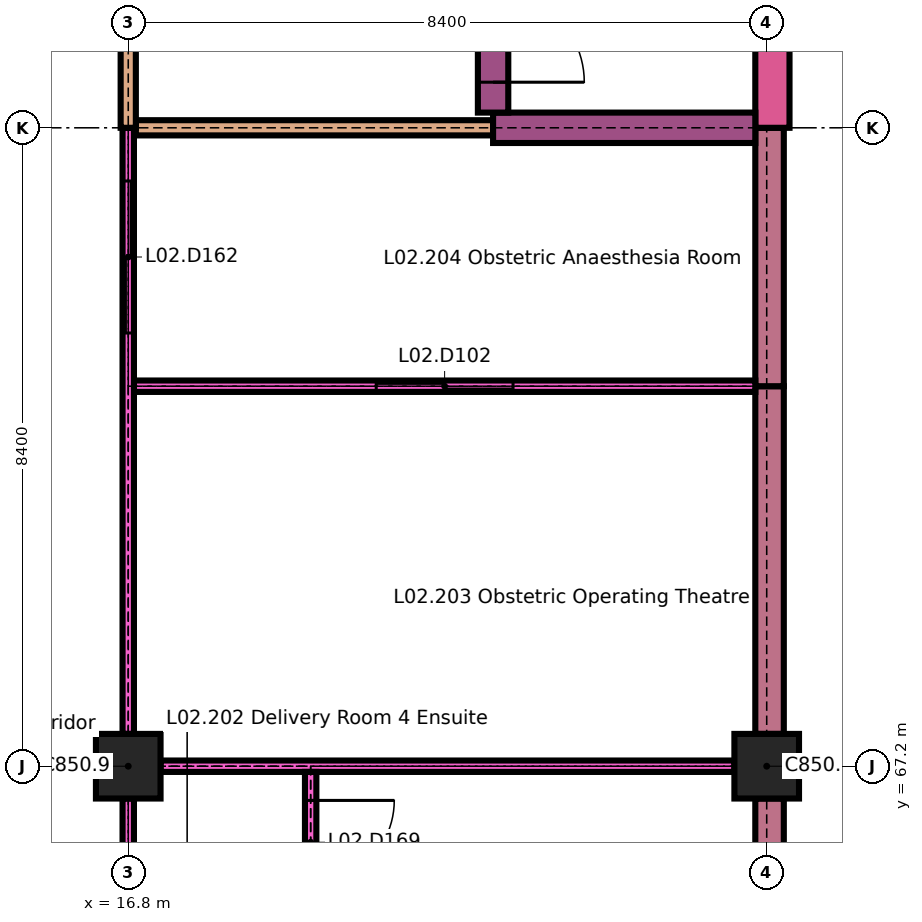
"""IFC4 building model, lengths in metres.
Left out: names, types, materials, properties, quantities, classifications, styles, units other than length and angle.
Written with IfcOpenShell. Run it as: python <this file> out.ifc"""

import sys

from ifc_helpers import new_model, si_unit, direction, frame, frame_2d, origin, origin_2d, place, context, subcontext, project, spatial, rectangle, extrude, element, fill, save


model = new_model("IFC4")
c1 = context("Model", 3, precision=1e-05, world=origin(), true_north=direction((0.0, 1.0)))
c2 = subcontext(c1, "Body", "Model", "MODEL_VIEW")
j1 = project(units=[si_unit("LENGTHUNIT", "METRE"), si_unit("PLANEANGLEUNIT", "RADIAN")], contexts=[c1])
p1 = place(None, origin())
s1 = spatial("IfcSite", under=j1, at=p1, CompositionType="ELEMENT")
p2 = place(p1, origin())
s2 = spatial("IfcBuilding", under=s1, at=p2, CompositionType="ELEMENT")
p3 = place(p2, frame((0.0, 0.0, 8.4)))
s3 = spatial("IfcBuildingStorey", under=s2, at=p3, CompositionType="ELEMENT", Elevation=8.4)
for number, where, z_axis, x_axis in (
    (1, (16.8, 67.2, 0.0), (0.0, 0.0, 1.0), (1.0, 0.0, 0.0)),
    (2, (25.2, 67.2, 0.0), (0.0, 0.0, 1.0), (1.0, 0.0, 0.0)),
):
    element("IfcColumn", number, at=place(p3, frame(where, z_axis=z_axis, x_axis=x_axis)), inside=s3, PredefinedType="COLUMN", context=c2, shape_type="SweptSolid", body=[
        extrude(rectangle(XDim=0.85, YDim=0.85, at=origin_2d()), origin(), (0.0, 0.0, 1.0), 4.2),
    ])
p4 = place(p3, frame((25.238, 63.0, 0.0), z_axis=(0.0, 0.0, 1.0), x_axis=(0.0, 1.0, 0.0)))
e3 = element("IfcWall", 3, at=p4, inside=s3, PredefinedType="SOLIDWALL", context=c2, shape_type="SweptSolid", body=[
    extrude(rectangle(XDim=3.775, YDim=0.375, at=frame_2d((1.887, 0.0))), origin(), (0.0, 0.0, 1.0), 3.9),
])
p5 = place(p4, frame((1.05, 0.0, 0.9)))
e4 = element("IfcOpeningElement", 4, at=p5, cuts=e3, PredefinedType="OPENING", context=c2, shape_type="SweptSolid", body=[
    extrude(rectangle(XDim=2.1, YDim=2.1, at=frame_2d((1.05, 1.05))), frame((0.0, 0.198, 0.0), z_axis=(0.0, -1.0, 0.0), x_axis=(1.0, 0.0, 0.0)), (0.0, 0.0, 1.0), 0.395),
])
p6 = place(p3, frame((25.238, 67.625, 0.0), z_axis=(0.0, 0.0, 1.0), x_axis=(0.0, 1.0, 0.0)))
e5 = element("IfcWall", 5, at=p6, inside=s3, PredefinedType="SOLIDWALL", context=c2, shape_type="SweptSolid", body=[
    extrude(rectangle(XDim=4.575, YDim=0.375, at=frame_2d((2.288, 0.0))), origin(), (0.0, 0.0, 1.0), 3.9),
])
p7 = place(p3, frame((25.238, 72.2, 0.0), z_axis=(0.0, 0.0, 1.0), x_axis=(0.0, 1.0, 0.0)))
e6 = element("IfcWall", 6, at=p7, inside=s3, PredefinedType="SOLIDWALL", context=c2, shape_type="SweptSolid", body=[
    extrude(rectangle(XDim=3.4, YDim=0.375, at=frame_2d((1.7, 0.0))), origin(), (0.0, 0.0, 1.0), 3.9),
])
p8 = place(p3, frame((25.275, 75.6, 0.0), z_axis=(0.0, 0.0, 1.0), x_axis=(0.0, 1.0, 0.0)))
e7 = element("IfcWall", 7, at=p8, inside=s3, PredefinedType="SOLIDWALL", context=c2, shape_type="SweptSolid", body=[
    extrude(rectangle(XDim=3.15, YDim=0.45, at=frame_2d((1.575, 0.0))), origin(), (0.0, 0.0, 1.0), 4.2),
])
p9 = place(p3, frame((17.225, 67.2, 0.0), z_axis=(0.0, 0.0, 1.0), x_axis=(1.0, 0.0, 0.0)))
e8 = element("IfcWall", 8, at=p9, inside=s3, PredefinedType="PARTITIONING", context=c2, shape_type="SweptSolid", body=[
    extrude(rectangle(XDim=7.55, YDim=0.15, at=frame_2d((3.775, 0.0))), origin(), (0.0, 0.0, 1.0), 4.2),
])
p10 = place(p3, frame((16.875, 72.2, 0.0), z_axis=(0.0, 0.0, 1.0), x_axis=(1.0, 0.0, 0.0)))
e9 = element("IfcWall", 9, at=p10, inside=s3, PredefinedType="PARTITIONING", context=c2, shape_type="SweptSolid", body=[
    extrude(rectangle(XDim=8.175, YDim=0.15, at=frame_2d((4.087, 0.0))), origin(), (0.0, 0.0, 1.0), 4.2),
])
p11 = place(p10, frame((3.188, 0.0, 0.0)))
e10 = element("IfcOpeningElement", 10, at=p11, cuts=e9, PredefinedType="OPENING", context=c2, shape_type="SweptSolid", body=[
    extrude(rectangle(XDim=1.8, YDim=2.4, at=frame_2d((0.9, 1.2))), frame((0.0, 0.085, 0.0), z_axis=(0.0, -1.0, 0.0), x_axis=(1.0, 0.0, 0.0)), (0.0, 0.0, 1.0), 0.17),
])
p12 = place(p3, frame((16.9, 75.6, 0.0), z_axis=(0.0, 0.0, 1.0), x_axis=(1.0, 0.0, 0.0)))
e11 = element("IfcWall", 11, at=p12, inside=s3, PredefinedType="PARTITIONING", context=c2, shape_type="SweptSolid", body=[
    extrude(rectangle(XDim=4.7, YDim=0.2, at=frame_2d((2.35, 0.0))), origin(), (0.0, 0.0, 1.0), 4.2),
])
p13 = place(p3, frame((21.6, 75.6, 0.0), z_axis=(0.0, 0.0, 1.0), x_axis=(1.0, 0.0, 0.0)))
e12 = element("IfcWall", 12, at=p13, inside=s3, PredefinedType="SHEAR", context=c2, shape_type="SweptSolid", body=[
    extrude(rectangle(XDim=3.45, YDim=0.4, at=frame_2d((1.725, 0.0))), origin(), (0.0, 0.0, 1.0), 4.2),
])
p14 = place(p3, frame((16.8, 59.225, 0.0), z_axis=(0.0, 0.0, 1.0), x_axis=(0.0, 1.0, 0.0)))
e13 = element("IfcWall", 13, at=p14, inside=s3, PredefinedType="PARTITIONING", context=c2, shape_type="SweptSolid", body=[
    extrude(rectangle(XDim=7.55, YDim=0.15, at=frame_2d((3.775, 0.0))), origin(), (0.0, 0.0, 1.0), 4.2),
])
p15 = place(p14, frame((1.925, 0.0, 0.0)))
e14 = element("IfcOpeningElement", 14, at=p15, cuts=e13, PredefinedType="OPENING", context=c2, shape_type="SweptSolid", body=[
    extrude(rectangle(XDim=1.5, YDim=2.4, at=frame_2d((0.75, 1.2))), frame((0.0, 0.085, 0.0), z_axis=(0.0, -1.0, 0.0), x_axis=(1.0, 0.0, 0.0)), (0.0, 0.0, 1.0), 0.17),
])
p16 = place(p14, frame((4.125, 0.0, 0.0)))
e15 = element("IfcOpeningElement", 15, at=p16, cuts=e13, PredefinedType="OPENING", context=c2, shape_type="SweptSolid", body=[
    extrude(rectangle(XDim=1.5, YDim=2.4, at=frame_2d((0.75, 1.2))), frame((0.0, 0.085, 0.0), z_axis=(0.0, -1.0, 0.0), x_axis=(1.0, 0.0, 0.0)), (0.0, 0.0, 1.0), 0.17),
])
p17 = place(p3, frame((16.8, 67.625, 0.0), z_axis=(0.0, 0.0, 1.0), x_axis=(0.0, 1.0, 0.0)))
e16 = element("IfcWall", 16, at=p17, inside=s3, PredefinedType="PARTITIONING", context=c2, shape_type="SweptSolid", body=[
    extrude(rectangle(XDim=7.975, YDim=0.15, at=frame_2d((3.988, 0.0))), origin(), (0.0, 0.0, 1.0), 4.2),
])
p18 = place(p17, frame((5.275, 0.0, 0.0)))
e17 = element("IfcOpeningElement", 17, at=p18, cuts=e16, PredefinedType="OPENING", context=c2, shape_type="SweptSolid", body=[
    extrude(rectangle(XDim=2.0, YDim=2.4, at=frame_2d((1.0, 1.2))), frame((0.0, 0.085, 0.0), z_axis=(0.0, -1.0, 0.0), x_axis=(1.0, 0.0, 0.0)), (0.0, 0.0, 1.0), 0.17),
])
p19 = place(p3, frame((16.8, 75.6, 0.0), z_axis=(0.0, 0.0, 1.0), x_axis=(0.0, 1.0, 0.0)))
e18 = element("IfcWall", 18, at=p19, inside=s3, PredefinedType="PARTITIONING", context=c2, shape_type="SweptSolid", body=[
    extrude(rectangle(XDim=8.3, YDim=0.2, at=frame_2d((4.15, 0.0))), origin(), (0.0, 0.0, 1.0), 4.2),
])
p20 = place(p19, frame((3.45, 0.0, 0.0)))
e19 = element("IfcOpeningElement", 19, at=p20, cuts=e18, PredefinedType="OPENING", context=c2, shape_type="SweptSolid", body=[
    extrude(rectangle(XDim=1.4, YDim=2.1, at=frame_2d((0.7, 1.05))), frame((0.0, 0.11, 0.0), z_axis=(0.0, -1.0, 0.0), x_axis=(1.0, 0.0, 0.0)), (0.0, 0.0, 1.0), 0.22),
])
p21 = place(p3, frame((19.2, 65.275, 0.0), z_axis=(0.0, 0.0, 1.0), x_axis=(0.0, 1.0, 0.0)))
e20 = element("IfcWall", 20, at=p21, inside=s3, PredefinedType="PARTITIONING", context=c2, shape_type="SweptSolid", body=[
    extrude(rectangle(XDim=1.85, YDim=0.15, at=frame_2d((0.925, 0.0))), origin(), (0.0, 0.0, 1.0), 4.2),
])
p22 = place(p21, frame((0.375, 0.0, 0.0)))
e21 = element("IfcOpeningElement", 21, at=p22, cuts=e20, PredefinedType="OPENING", context=c2, shape_type="SweptSolid", body=[
    extrude(rectangle(XDim=1.1, YDim=2.1, at=frame_2d((0.55, 1.05))), frame((0.0, 0.085, 0.0), z_axis=(0.0, -1.0, 0.0), x_axis=(1.0, 0.0, 0.0)), (0.0, 0.0, 1.0), 0.17),
])
p23 = place(p3, frame((21.6, 75.8, 0.0), z_axis=(0.0, 0.0, 1.0), x_axis=(0.0, 1.0, 0.0)))
e22 = element("IfcWall", 22, at=p23, inside=s3, PredefinedType="SHEAR", context=c2, shape_type="SweptSolid", body=[
    extrude(rectangle(XDim=8.0, YDim=0.4, at=frame_2d((4.0, 0.0))), origin(), (0.0, 0.0, 1.0), 4.2),
])
p24 = place(p23, frame((0.4, 0.0, 0.0)))
e23 = element("IfcOpeningElement", 23, at=p24, cuts=e22, PredefinedType="OPENING", context=c2, shape_type="SweptSolid", body=[
    extrude(rectangle(XDim=1.2, YDim=2.1, at=frame_2d((0.6, 1.05))), frame((0.0, 0.21, 0.0), z_axis=(0.0, -1.0, 0.0), x_axis=(1.0, 0.0, 0.0)), (0.0, 0.0, 1.0), 0.42),
])
p25 = place(p11, origin())
e24 = element("IfcDoor", 24, at=p25, inside=s3, OperationType="DOUBLE_DOOR_SLIDING", PredefinedType="DOOR", context=c2, shape_type="SweptSolid", body=[
    extrude(rectangle(XDim=1.8, YDim=2.4, at=frame_2d((0.9, 1.2))), frame((0.0, 0.045, 0.0), z_axis=(0.0, -1.0, 0.0), x_axis=(1.0, 0.0, 0.0)), (0.0, 0.0, 1.0), 0.09),
])
fill(e10, e24)
p26 = place(p18, origin())
e25 = element("IfcDoor", 25, at=p26, inside=s3, OperationType="DOUBLE_DOOR_SLIDING", PredefinedType="DOOR", context=c2, shape_type="SweptSolid", body=[
    extrude(rectangle(XDim=2.0, YDim=2.4, at=frame_2d((1.0, 1.2))), frame((0.0, 0.045, 0.0), z_axis=(0.0, -1.0, 0.0), x_axis=(1.0, 0.0, 0.0)), (0.0, 0.0, 1.0), 0.09),
])
fill(e17, e25)
p27 = place(p22, origin())
e26 = element("IfcDoor", 26, at=p27, inside=s3, OperationType="SINGLE_SWING_RIGHT", PredefinedType="DOOR", context=c2, shape_type="SweptSolid", body=[
    extrude(rectangle(XDim=1.1, YDim=2.1, at=frame_2d((0.55, 1.05))), frame((0.0, 0.025, 0.0), z_axis=(0.0, -1.0, 0.0), x_axis=(1.0, 0.0, 0.0)), (0.0, 0.0, 1.0), 0.05),
])
fill(e21, e26)
p28 = place(p24, origin())
e27 = element("IfcDoor", 27, at=p28, inside=s3, OperationType="SINGLE_SWING_LEFT", PredefinedType="DOOR", context=c2, shape_type="SweptSolid", body=[
    extrude(rectangle(XDim=1.2, YDim=2.1, at=frame_2d((0.6, 1.05))), frame((0.0, 0.025, 0.0), z_axis=(0.0, -1.0, 0.0), x_axis=(1.0, 0.0, 0.0)), (0.0, 0.0, 1.0), 0.05),
])
fill(e23, e27)
save(model, sys.argv[1])
